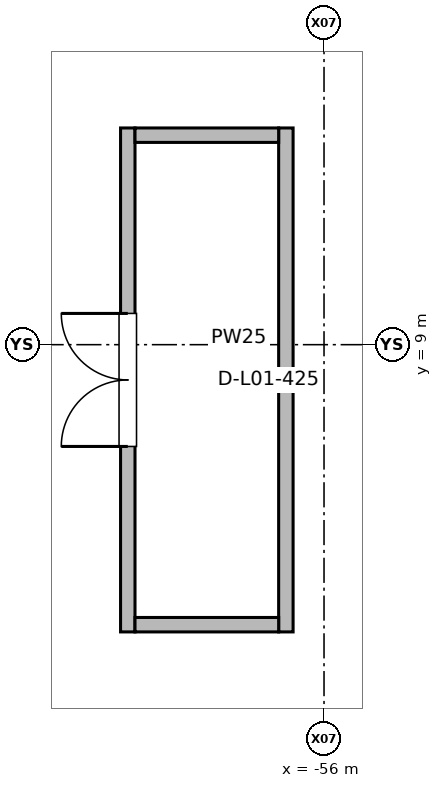
"""IFC4 building model, lengths in metres.
Left out: names, types, materials, properties, quantities, classifications, styles, units other than length and angle.
Written with IfcOpenShell. Run it as: python <this file> out.ifc"""

import sys

from ifc_helpers import new_model, si_unit, direction, frame, frame_2d, origin, place, context, subcontext, project, spatial, rectangle, extrude, element, fill, save


model = new_model("IFC4")
c1 = context("Model", 3, precision=1e-05, world=origin(), true_north=direction((0.0, 1.0)))
c2 = subcontext(c1, "Body", "Model", "MODEL_VIEW")
j1 = project(units=[si_unit("LENGTHUNIT", "METRE"), si_unit("PLANEANGLEUNIT", "RADIAN")], contexts=[c1])
p1 = place(None, origin())
s1 = spatial("IfcSite", under=j1, at=p1, CompositionType="ELEMENT")
p2 = place(p1, origin())
s2 = spatial("IfcBuilding", under=s1, at=p2, CompositionType="ELEMENT")
p3 = place(p2, origin())
s3 = spatial("IfcBuildingStorey", under=s2, at=p3, CompositionType="ELEMENT", Elevation=0.0)
p4 = place(p3, frame((-58.582, 5.221, 0.0), z_axis=(0.0, 0.0, 1.0), x_axis=(0.0, 1.0, 0.0)))
e1 = element("IfcWall", 1, at=p4, inside=s3, PredefinedType="PARTITIONING", context=c2, shape_type="SweptSolid", body=[
    extrude(rectangle(XDim=6.63, YDim=0.19, at=frame_2d((3.315, 0.0))), origin(), (0.0, 0.0, 1.0), 5.02),
])
p5 = place(p4, frame((2.44, 0.0, 0.0)))
e2 = element("IfcOpeningElement", 2, at=p5, cuts=e1, PredefinedType="OPENING", context=c2, shape_type="SweptSolid", body=[
    extrude(rectangle(XDim=1.75, YDim=2.35, at=frame_2d((0.875, 1.175))), frame((0.0, 0.105, 0.0), z_axis=(0.0, -1.0, 0.0), x_axis=(1.0, 0.0, 0.0)), (0.0, 0.0, 1.0), 0.21),
])
p6 = place(p3, frame((-56.502, 5.221, 0.0), z_axis=(0.0, 0.0, 1.0), x_axis=(0.0, 1.0, 0.0)))
e3 = element("IfcWall", 3, at=p6, inside=s3, PredefinedType="PARTITIONING", context=c2, shape_type="SweptSolid", body=[
    extrude(rectangle(XDim=6.63, YDim=0.19, at=frame_2d((3.315, 0.0))), origin(), (0.0, 0.0, 1.0), 5.02),
])
for number, where, z_axis, x_axis in (
    (4, (-58.487, 5.316, 0.0), (0.0, 0.0, 1.0), (1.0, 0.0, 0.0)),
    (5, (-58.487, 11.756, 0.0), (0.0, 0.0, 1.0), (1.0, 0.0, 0.0)),
):
    element("IfcWall", number, at=place(p3, frame(where, z_axis=z_axis, x_axis=x_axis)), inside=s3, PredefinedType="PARTITIONING", context=c2, shape_type="SweptSolid", body=[
        extrude(rectangle(XDim=1.89, YDim=0.19, at=frame_2d((0.945, 0.0))), origin(), (0.0, 0.0, 1.0), 5.02),
    ])
p7 = place(p5, origin())
e6 = element("IfcDoor", 6, at=p7, inside=s3, OperationType="DOUBLE_DOOR_SINGLE_SWING", PredefinedType="DOOR", context=c2, shape_type="SweptSolid", body=[
    extrude(rectangle(XDim=1.75, YDim=2.35, at=frame_2d((0.875, 1.175))), frame((0.0, 0.025, 0.0), z_axis=(0.0, -1.0, 0.0), x_axis=(1.0, 0.0, 0.0)), (0.0, 0.0, 1.0), 0.05),
])
fill(e2, e6)
save(model, sys.argv[1])
